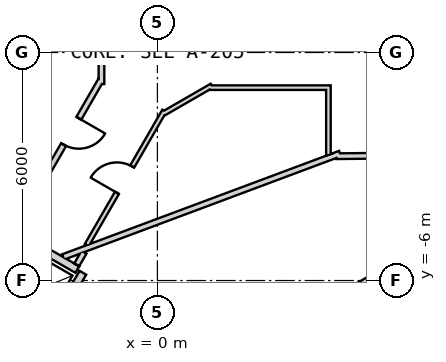
"""IFC4 building model, lengths in metres.
Left out: names, types, materials, properties, quantities, classifications, styles, units other than length and angle.
Written with IfcOpenShell. Run it as: python <this file> out.ifc"""

import sys

from ifc_helpers import new_model, si_unit, direction, frame, frame_2d, origin, place, context, subcontext, project, spatial, rectangle, extrude, element, fill, save


model = new_model("IFC4")
c1 = context("Model", 3, precision=1e-05, world=origin(), true_north=direction((0.0, 1.0)))
c2 = subcontext(c1, "Body", "Model", "MODEL_VIEW")
j1 = project(units=[si_unit("LENGTHUNIT", "METRE"), si_unit("PLANEANGLEUNIT", "RADIAN")], contexts=[c1])
p1 = place(None, origin())
s1 = spatial("IfcSite", under=j1, at=p1, CompositionType="ELEMENT")
p2 = place(p1, origin())
s2 = spatial("IfcBuilding", under=s1, at=p2, CompositionType="ELEMENT")
p3 = place(p2, frame((0.0, 0.0, 15.5)))
s3 = spatial("IfcBuildingStorey", under=s2, at=p3, CompositionType="ELEMENT", Elevation=15.5)
p4 = place(p3, frame((-7.825, -17.97, 0.0), z_axis=(0.0, 0.0, 1.0), x_axis=(0.866028369851, 0.499994862586, 0.0)))
e1 = element("IfcWall", 1, at=p4, inside=s3, PredefinedType="SHEAR", context=c2, shape_type="SweptSolid", body=[
    extrude(rectangle(XDim=31.523, YDim=0.9, at=frame_2d((15.762, 0.0))), origin(), (0.0, 0.0, 1.0), 6.0),
])
p5 = place(p4, frame((7.062, 0.0, 0.0)))
e2 = element("IfcOpeningElement", 2, at=p5, cuts=e1, PredefinedType="OPENING", context=c2, shape_type="SweptSolid", body=[
    extrude(rectangle(XDim=1.2, YDim=2.4, at=frame_2d((0.6, 1.2))), frame((0.0, 0.46, 0.0), z_axis=(0.0, -1.0, 0.0), x_axis=(1.0, 0.0, 0.0)), (0.0, 0.0, 1.0), 0.92),
])
p6 = place(p4, frame((9.762, 0.0, 0.0)))
e3 = element("IfcOpeningElement", 3, at=p6, cuts=e1, PredefinedType="OPENING", context=c2, shape_type="SweptSolid", body=[
    extrude(rectangle(XDim=1.2, YDim=2.4, at=frame_2d((0.6, 1.2))), frame((0.0, 0.46, 0.0), z_axis=(0.0, -1.0, 0.0), x_axis=(1.0, 0.0, 0.0)), (0.0, 0.0, 1.0), 0.92),
])
p7 = place(p4, frame((12.462, 0.0, 0.0)))
e4 = element("IfcOpeningElement", 4, at=p7, cuts=e1, PredefinedType="OPENING", context=c2, shape_type="SweptSolid", body=[
    extrude(rectangle(XDim=1.2, YDim=2.4, at=frame_2d((0.6, 1.2))), frame((0.0, 0.46, 0.0), z_axis=(0.0, -1.0, 0.0), x_axis=(1.0, 0.0, 0.0)), (0.0, 0.0, 1.0), 0.92),
])
p8 = place(p4, frame((15.162, 0.0, 0.0)))
e5 = element("IfcOpeningElement", 5, at=p8, cuts=e1, PredefinedType="OPENING", context=c2, shape_type="SweptSolid", body=[
    extrude(rectangle(XDim=1.2, YDim=2.4, at=frame_2d((0.6, 1.2))), frame((0.0, 0.46, 0.0), z_axis=(0.0, -1.0, 0.0), x_axis=(1.0, 0.0, 0.0)), (0.0, 0.0, 1.0), 0.92),
])
p9 = place(p4, frame((17.862, 0.0, 0.0)))
e6 = element("IfcOpeningElement", 6, at=p9, cuts=e1, PredefinedType="OPENING", context=c2, shape_type="SweptSolid", body=[
    extrude(rectangle(XDim=1.2, YDim=2.4, at=frame_2d((0.6, 1.2))), frame((0.0, 0.46, 0.0), z_axis=(0.0, -1.0, 0.0), x_axis=(1.0, 0.0, 0.0)), (0.0, 0.0, 1.0), 0.92),
])
p10 = place(p4, frame((20.562, 0.0, 0.0)))
e7 = element("IfcOpeningElement", 7, at=p10, cuts=e1, PredefinedType="OPENING", context=c2, shape_type="SweptSolid", body=[
    extrude(rectangle(XDim=1.2, YDim=2.4, at=frame_2d((0.6, 1.2))), frame((0.0, 0.46, 0.0), z_axis=(0.0, -1.0, 0.0), x_axis=(1.0, 0.0, 0.0)), (0.0, 0.0, 1.0), 0.92),
])
p11 = place(p4, frame((26.712, 0.0, 0.0)))
e8 = element("IfcOpeningElement", 8, at=p11, cuts=e1, PredefinedType="OPENING", context=c2, shape_type="SweptSolid", body=[
    extrude(rectangle(XDim=1.2, YDim=2.4, at=frame_2d((0.6, 1.2))), frame((0.0, 0.46, 0.0), z_axis=(0.0, -1.0, 0.0), x_axis=(1.0, 0.0, 0.0)), (0.0, 0.0, 1.0), 0.92),
])
p12 = place(p4, frame((3.612, 0.0, 0.0)))
e9 = element("IfcOpeningElement", 9, at=p12, cuts=e1, PredefinedType="OPENING", context=c2, shape_type="SweptSolid", body=[
    extrude(rectangle(XDim=1.2, YDim=2.4, at=frame_2d((0.6, 1.2))), frame((0.0, 0.46, 0.0), z_axis=(0.0, -1.0, 0.0), x_axis=(1.0, 0.0, 0.0)), (0.0, 0.0, 1.0), 0.92),
])
p13 = place(p3, frame((0.483, -8.936, 0.0), z_axis=(0.0, 0.0, 1.0), x_axis=(0.866030989016, 0.499990325971, 0.0)))
e10 = element("IfcWall", 10, at=p13, inside=s3, PredefinedType="PLUMBINGWALL", context=c2, shape_type="SweptSolid", body=[
    extrude(rectangle(XDim=8.1, YDim=0.2, at=frame_2d((4.05, 0.0))), origin(), (0.0, 0.0, 1.0), 5.7),
])
p14 = place(p3, frame((-1.961, -5.796, 0.0), z_axis=(0.0, 0.0, 1.0), x_axis=(-0.508647062354, -0.860975125052, 0.0)))
e11 = element("IfcWall", 11, at=p14, inside=s3, PredefinedType="PLUMBINGWALL", context=c2, shape_type="SweptSolid", body=[
    extrude(rectangle(XDim=3.1, YDim=0.2, at=frame_2d((1.55, 0.0))), origin(), (0.0, 0.0, 1.0), 5.7),
])
p15 = place(p3, frame((-3.953, -4.646, 0.0), z_axis=(0.0, 0.0, 1.0), x_axis=(0.866040491692, -0.499973866067, 0.0)))
e12 = element("IfcWall", 12, at=p15, inside=s3, PredefinedType="PLUMBINGWALL", context=c2, shape_type="SweptSolid", body=[
    extrude(rectangle(XDim=2.129, YDim=0.2, at=frame_2d((1.065, 0.0))), origin(), (0.0, 0.0, 1.0), 5.7),
])
p16 = place(p3, frame((4.807, -2.659, 0.0), z_axis=(0.0, 0.0, 1.0), x_axis=(-0.936818342118, -0.349816228714, 0.0)))
e13 = element("IfcWall", 13, at=p16, inside=s3, PredefinedType="PLUMBINGWALL", context=c2, shape_type="SweptSolid", body=[
    extrude(rectangle(XDim=7.78, YDim=0.15, at=frame_2d((3.89, 0.0))), origin(), (0.0, 0.0, 1.0), 5.7),
])
p17 = place(p3, frame((0.182, -1.535, 0.0), z_axis=(0.0, 0.0, 1.0), x_axis=(-0.499988401207, -0.866032100247, 0.0)))
e14 = element("IfcWall", 14, at=p17, inside=s3, PredefinedType="PARTITIONING", context=c2, shape_type="SweptSolid", body=[
    extrude(rectangle(XDim=4.079, YDim=0.12, at=frame_2d((2.04, 0.0))), origin(), (0.0, 0.0, 1.0), 5.7),
])
p18 = place(p17, frame((1.691, 0.0, 0.0)))
e15 = element("IfcOpeningElement", 15, at=p18, cuts=e14, PredefinedType="OPENING", context=c2, shape_type="SweptSolid", body=[
    extrude(rectangle(XDim=0.8, YDim=2.1, at=frame_2d((0.4, 1.05))), frame((0.0, 0.07, 0.0), z_axis=(0.0, -1.0, 0.0), x_axis=(1.0, 0.0, 0.0)), (0.0, 0.0, 1.0), 0.14),
])
p19 = place(p3, frame((1.432, -0.873, 0.0), z_axis=(0.0, 0.0, 1.0), x_axis=(-0.866029572143, -0.499992780121, 0.0)))
e16 = element("IfcWall", 16, at=p19, inside=s3, PredefinedType="PARTITIONING", context=c2, shape_type="SweptSolid", body=[
    extrude(rectangle(XDim=1.485, YDim=0.12, at=frame_2d((0.743, 0.0))), origin(), (0.0, 0.0, 1.0), 5.7),
])
p20 = place(p3, frame((4.56, -0.925, 0.0), z_axis=(0.0, 0.0, 1.0), x_axis=(-1.0, 0.0, 0.0)))
e17 = element("IfcWall", 17, at=p20, inside=s3, PredefinedType="PARTITIONING", context=c2, shape_type="SweptSolid", body=[
    extrude(rectangle(XDim=3.199, YDim=0.12, at=frame_2d((1.6, 0.0))), origin(), (0.0, 0.0, 1.0), 5.7),
])
p21 = place(p3, frame((4.5, -2.7, 0.0), z_axis=(0.0, 0.0, 1.0), x_axis=(0.0, 1.0, 0.0)))
e18 = element("IfcWall", 18, at=p21, inside=s3, PredefinedType="PARTITIONING", context=c2, shape_type="SweptSolid", body=[
    extrude(rectangle(XDim=1.715, YDim=0.12, at=frame_2d((0.857, 0.0))), origin(), (0.0, 0.0, 1.0), 5.7),
])
p22 = place(p3, frame((-1.932, -5.256, 0.0), z_axis=(0.0, 0.0, 1.0), x_axis=(-0.499777709171, -0.866153705422, 0.0)))
e19 = element("IfcWall", 19, at=p22, inside=s3, PredefinedType="PLUMBINGWALL", context=c2, shape_type="SweptSolid", body=[
    extrude(rectangle(XDim=0.383, YDim=0.15, at=frame_2d((0.191, 0.0))), origin(), (0.0, 0.0, 1.0), 5.7),
])
p23 = place(p3, frame((7.575, -2.699, 0.0), z_axis=(0.0, 0.0, 1.0), x_axis=(-0.999947791603, -0.010218320275, 0.0)))
e20 = element("IfcWall", 20, at=p23, inside=s3, PredefinedType="PLUMBINGWALL", context=c2, shape_type="SweptSolid", body=[
    extrude(rectangle(XDim=2.867, YDim=0.15, at=frame_2d((1.434, 0.0))), origin(), (0.0, 0.0, 1.0), 5.7),
])
p24 = place(p23, frame((1.071, 0.0, 0.0)))
e21 = element("IfcOpeningElement", 21, at=p24, cuts=e20, PredefinedType="OPENING", context=c2, shape_type="SweptSolid", body=[
    extrude(rectangle(XDim=0.8, YDim=2.1, at=frame_2d((0.4, 1.05))), frame((0.0, 0.085, 0.0), z_axis=(0.0, -1.0, 0.0), x_axis=(1.0, 0.0, 0.0)), (0.0, 0.0, 1.0), 0.17),
])
p25 = place(p3, frame((-1.472, -0.83, 0.0), z_axis=(0.0, 0.0, 1.0), x_axis=(0.0, 1.0, 0.0)))
e22 = element("IfcWall", 22, at=p25, inside=s3, PredefinedType="PLUMBINGWALL", context=c2, shape_type="SweptSolid", body=[
    extrude(rectangle(XDim=1.507, YDim=0.15, at=frame_2d((0.753, 0.0))), origin(), (0.0, 0.0, 1.0), 5.7),
])
p26 = place(p3, frame((-3.089, -3.5, 0.0), z_axis=(0.0, 0.0, 1.0), x_axis=(0.500025362525, 0.866010760229, 0.0)))
e23 = element("IfcWall", 23, at=p26, inside=s3, PredefinedType="PLUMBINGWALL", context=c2, shape_type="SweptSolid", body=[
    extrude(rectangle(XDim=3.209, YDim=0.15, at=frame_2d((1.604, 0.0))), origin(), (0.0, 0.0, 1.0), 5.7),
])
p27 = place(p26, frame((1.242, 0.0, 0.0)))
e24 = element("IfcOpeningElement", 24, at=p27, cuts=e23, PredefinedType="OPENING", context=c2, shape_type="SweptSolid", body=[
    extrude(rectangle(XDim=0.8, YDim=2.1, at=frame_2d((0.4, 1.05))), frame((0.0, 0.085, 0.0), z_axis=(0.0, -1.0, 0.0), x_axis=(1.0, 0.0, 0.0)), (0.0, 0.0, 1.0), 0.17),
])
p28 = place(p18, origin())
e25 = element("IfcDoor", 25, at=p28, inside=s3, OperationType="SINGLE_SWING_RIGHT", PredefinedType="USERDEFINED", context=c2, shape_type="SweptSolid", body=[
    extrude(rectangle(XDim=0.8, YDim=2.1, at=frame_2d((0.4, 1.05))), frame((0.0, 0.025, 0.0), z_axis=(0.0, -1.0, 0.0), x_axis=(1.0, 0.0, 0.0)), (0.0, 0.0, 1.0), 0.05),
])
fill(e15, e25)
p29 = place(p27, origin())
e26 = element("IfcDoor", 26, at=p29, inside=s3, OperationType="SINGLE_SWING_RIGHT", PredefinedType="USERDEFINED", context=c2, shape_type="SweptSolid", body=[
    extrude(rectangle(XDim=0.8, YDim=2.1, at=frame_2d((0.4, 1.05))), frame((0.0, 0.025, 0.0), z_axis=(0.0, -1.0, 0.0), x_axis=(1.0, 0.0, 0.0)), (0.0, 0.0, 1.0), 0.05),
])
fill(e24, e26)
save(model, sys.argv[1])
